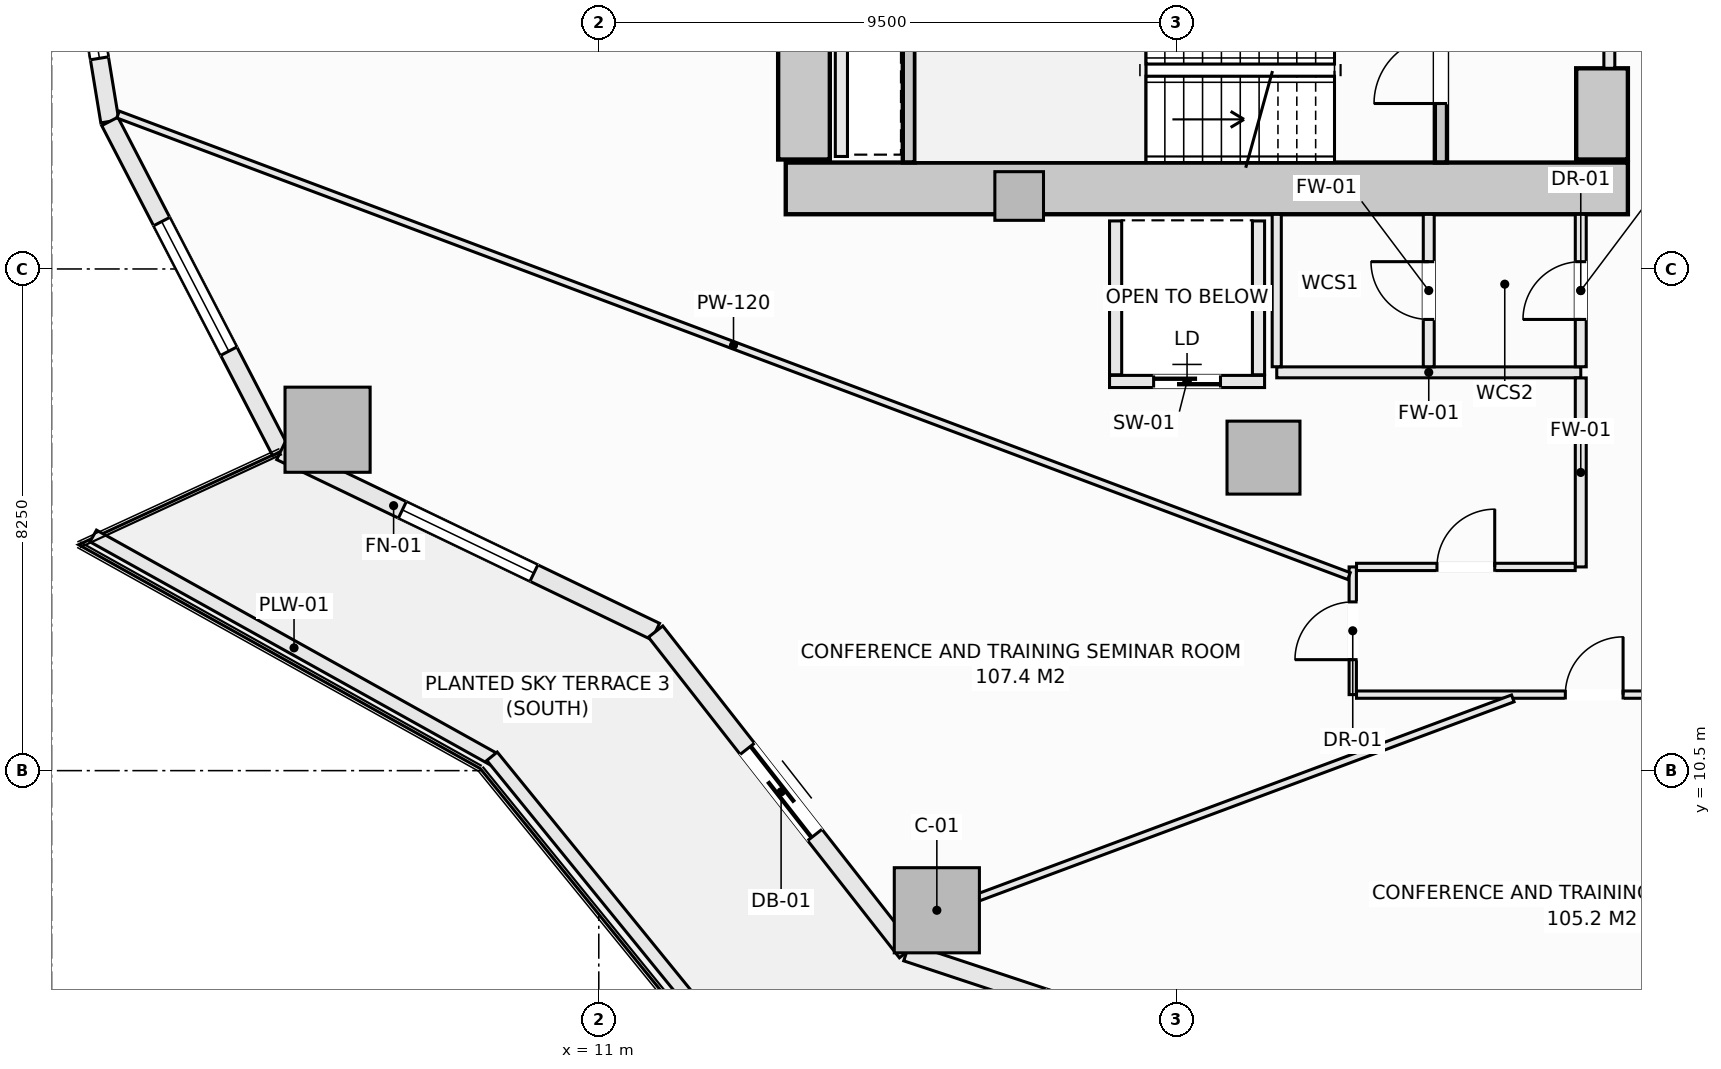
"""IFC4 building model, lengths in metres.
Left out: names, types, materials, properties, quantities, classifications, styles, units other than length and angle.
Written with IfcOpenShell. Run it as: python <this file> out.ifc"""

import sys

from ifc_helpers import new_model, si_unit, direction, frame, frame_2d, origin, origin_2d, place, context, subcontext, project, spatial, rectangle, extrude, element, fill, save


model = new_model("IFC4")
c1 = context("Model", 3, precision=1e-05, world=origin(), true_north=direction((0.0, 1.0)))
c2 = subcontext(c1, "Body", "Model", "MODEL_VIEW")
j1 = project(units=[si_unit("LENGTHUNIT", "METRE"), si_unit("PLANEANGLEUNIT", "RADIAN")], contexts=[c1])
p1 = place(None, origin())
s1 = spatial("IfcSite", under=j1, at=p1, CompositionType="ELEMENT")
p2 = place(p1, origin())
s2 = spatial("IfcBuilding", under=s1, at=p2, CompositionType="ELEMENT")
p3 = place(p2, frame((0.0, 0.0, 34.2)))
s3 = spatial("IfcBuildingStorey", under=s2, at=p3, CompositionType="ELEMENT", Elevation=34.2)
p4 = place(p3, frame((14.075, 20.075, -0.28), z_axis=(0.0, 0.0, 1.0), x_axis=(1.0, 0.0, 0.0)))
e1 = element("IfcWall", 1, at=p4, inside=s3, PredefinedType="SHEAR", context=c2, shape_type="SweptSolid", body=[
    extrude(rectangle(XDim=13.85, YDim=0.85, at=frame_2d((6.925, 0.0))), origin(), (0.0, 0.0, 1.0), 3.85),
])
p5 = place(p3, frame((14.375, 20.55, -0.28), z_axis=(0.0, 0.0, 1.0), x_axis=(0.0, 1.0, 0.0)))
e2 = element("IfcWall", 2, at=p5, inside=s3, PredefinedType="SHEAR", context=c2, shape_type="SweptSolid", body=[
    extrude(rectangle(XDim=12.9, YDim=0.85, at=frame_2d((6.45, 0.0))), origin(), (0.0, 0.0, 1.0), 3.85),
])
p6 = place(p3, frame((27.5, 20.55, -0.28), z_axis=(0.0, 0.0, 1.0), x_axis=(0.0, 1.0, 0.0)))
e3 = element("IfcWall", 3, at=p6, inside=s3, PredefinedType="SHEAR", context=c2, shape_type="SweptSolid", body=[
    extrude(rectangle(XDim=1.5, YDim=0.85, at=frame_2d((0.75, 0.0))), origin(), (0.0, 0.0, 1.0), 3.85),
])
for number, where, z_axis, x_axis in (
    (4, (6.54, 16.106, -0.28), (0.0, 0.0, 1.0), (1.0, 0.0, 0.0)),
    (5, (16.56, 8.204, -0.28), (0.0, 0.0, 1.0), (1.0, 0.0, 0.0)),
):
    element("IfcColumn", number, at=place(p3, frame(where, z_axis=z_axis, x_axis=x_axis)), inside=s3, PredefinedType="COLUMN", context=c2, shape_type="SweptSolid", body=[
        extrude(rectangle(XDim=1.4, YDim=1.4, at=origin_2d()), origin(), (0.0, 0.0, 1.0), 3.85),
    ])
p7 = place(p3, frame((21.932, 15.648, -0.28), z_axis=(0.0, 0.0, 1.0), x_axis=(1.0, 0.0, 0.0)))
e6 = element("IfcColumn", 6, at=p7, inside=s3, PredefinedType="COLUMN", context=c2, shape_type="SweptSolid", body=[
    extrude(rectangle(XDim=1.2, YDim=1.2, at=origin_2d()), origin(), (0.0, 0.0, 1.0), 3.85),
])
p8 = place(p3, frame((17.914, 19.95, -0.28), z_axis=(0.0, 0.0, 1.0), x_axis=(1.0, 0.0, 0.0)))
e7 = element("IfcColumn", 7, at=p8, inside=s3, PredefinedType="PILASTER", context=c2, shape_type="SweptSolid", body=[
    extrude(rectangle(XDim=0.8, YDim=0.8, at=origin_2d()), origin(), (0.0, 0.0, 1.0), 3.85),
])
p9 = place(p3, frame((2.0, 27.0, 0.0), z_axis=(0.0, 0.0, 1.0), x_axis=(0.162366057843, -0.98673059305, 0.0)))
e8 = element("IfcWall", 8, at=p9, inside=s3, PredefinedType="SOLIDWALL", context=c2, shape_type="SweptSolid", body=[
    extrude(rectangle(XDim=5.902, YDim=0.3, at=frame_2d((2.951, 0.0))), origin(), (0.0, 0.0, 1.0), 3.093),
])
p10 = place(p9, frame((2.45, 0.0, 0.85)))
e9 = element("IfcOpeningElement", 9, at=p10, cuts=e8, PredefinedType="OPENING", context=c2, shape_type="SweptSolid", body=[
    extrude(rectangle(XDim=2.4, YDim=1.9, at=frame_2d((1.2, 0.95))), frame((0.0, 0.16, 0.0), z_axis=(0.0, -1.0, 0.0), x_axis=(1.0, 0.0, 0.0)), (0.0, 0.0, 1.0), 0.32),
])
p11 = place(p3, frame((2.958, 21.177, 0.0), z_axis=(0.0, 0.0, 1.0), x_axis=(0.459809804413, -0.88801742312, 0.0)))
e10 = element("IfcWall", 10, at=p11, inside=s3, PredefinedType="SOLIDWALL", context=c2, shape_type="SweptSolid", body=[
    extrude(rectangle(XDim=6.111, YDim=0.3, at=frame_2d((3.055, 0.0))), origin(), (0.0, 0.0, 1.0), 3.093),
])
p12 = place(p11, frame((1.855, 0.0, 0.85)))
e11 = element("IfcOpeningElement", 11, at=p12, cuts=e10, PredefinedType="OPENING", context=c2, shape_type="SweptSolid", body=[
    extrude(rectangle(XDim=2.4, YDim=1.9, at=frame_2d((1.2, 0.95))), frame((0.0, 0.16, 0.0), z_axis=(0.0, -1.0, 0.0), x_axis=(1.0, 0.0, 0.0)), (0.0, 0.0, 1.0), 0.32),
])
p13 = place(p3, frame((5.768, 15.75, 0.0), z_axis=(0.0, 0.0, 1.0), x_axis=(0.901360393999, -0.433069786673, 0.0)))
e12 = element("IfcWall", 12, at=p13, inside=s3, PredefinedType="SOLIDWALL", context=c2, shape_type="SweptSolid", body=[
    extrude(rectangle(XDim=6.842, YDim=0.3, at=frame_2d((3.421, 0.0))), origin(), (0.0, 0.0, 1.0), 3.093),
])
p14 = place(p13, frame((2.221, 0.0, 0.85)))
e13 = element("IfcOpeningElement", 13, at=p14, cuts=e12, PredefinedType="OPENING", context=c2, shape_type="SweptSolid", body=[
    extrude(rectangle(XDim=2.4, YDim=1.9, at=frame_2d((1.2, 0.95))), frame((0.0, 0.16, 0.0), z_axis=(0.0, -1.0, 0.0), x_axis=(1.0, 0.0, 0.0)), (0.0, 0.0, 1.0), 0.32),
])
p15 = place(p3, frame((11.935, 12.787, 0.0), z_axis=(0.0, 0.0, 1.0), x_axis=(0.616421309777, -0.787416515482, 0.0)))
e14 = element("IfcWall", 14, at=p15, inside=s3, PredefinedType="SOLIDWALL", context=c2, shape_type="SweptSolid", body=[
    extrude(rectangle(XDim=6.696, YDim=0.3, at=frame_2d((3.348, 0.0))), origin(), (0.0, 0.0, 1.0), 3.093),
])
p16 = place(p15, frame((2.448, 0.0, 0.0)))
e15 = element("IfcOpeningElement", 15, at=p16, cuts=e14, PredefinedType="OPENING", context=c2, shape_type="SweptSolid", body=[
    extrude(rectangle(XDim=1.8, YDim=2.25, at=frame_2d((0.9, 1.125))), frame((0.0, 0.16, 0.0), z_axis=(0.0, -1.0, 0.0), x_axis=(1.0, 0.0, 0.0)), (0.0, 0.0, 1.0), 0.32),
])
p17 = place(p3, frame((16.062, 7.514, 0.0), z_axis=(0.0, 0.0, 1.0), x_axis=(0.949238715533, -0.31455661006, 0.0)))
e16 = element("IfcWall", 16, at=p17, inside=s3, PredefinedType="SOLIDWALL", context=c2, shape_type="SweptSolid", body=[
    extrude(rectangle(XDim=7.146, YDim=0.3, at=frame_2d((3.573, 0.0))), origin(), (0.0, 0.0, 1.0), 3.093),
])
p18 = place(p17, frame((2.373, 0.0, 0.85)))
e17 = element("IfcOpeningElement", 17, at=p18, cuts=e16, PredefinedType="OPENING", context=c2, shape_type="SweptSolid", body=[
    extrude(rectangle(XDim=2.4, YDim=1.9, at=frame_2d((1.2, 0.95))), frame((0.0, 0.16, 0.0), z_axis=(0.0, -1.0, 0.0), x_axis=(1.0, 0.0, 0.0)), (0.0, 0.0, 1.0), 0.32),
])
p19 = place(p3, frame((2.685, 14.359, 0.0), z_axis=(0.0, 0.0, 1.0), x_axis=(0.873500119739, -0.48682393205, 0.0)))
e18 = element("IfcWall", 18, at=p19, inside=s3, PredefinedType="PARAPET", context=c2, shape_type="SweptSolid", body=[
    extrude(rectangle(XDim=7.562, YDim=0.22, at=frame_2d((3.781, 0.0))), origin(), (0.0, 0.0, 1.0), 0.52),
])
p20 = place(p3, frame((9.244, 10.736, 0.0), z_axis=(0.0, 0.0, 1.0), x_axis=(0.630997450658, -0.775784903993, 0.0)))
e19 = element("IfcWall", 19, at=p20, inside=s3, PredefinedType="PARAPET", context=c2, shape_type="SweptSolid", body=[
    extrude(rectangle(XDim=7.718, YDim=0.22, at=frame_2d((3.859, 0.0))), origin(), (0.0, 0.0, 1.0), 0.52),
])
p21 = place(p3, frame((24.85, 20.502, -0.28), z_axis=(0.0, 0.0, 1.0), x_axis=(0.0, 1.0, 0.0)))
e20 = element("IfcWall", 20, at=p21, inside=s3, PredefinedType="SHEAR", context=c2, shape_type="SweptSolid", body=[
    extrude(rectangle(XDim=3.038, YDim=0.2, at=frame_2d((1.519, 0.0))), origin(), (0.0, 0.0, 1.0), 3.85),
])
p22 = place(p21, frame((0.969, 0.0, 0.28)))
e21 = element("IfcOpeningElement", 21, at=p22, cuts=e20, PredefinedType="OPENING", context=c2, shape_type="SweptSolid", body=[
    extrude(rectangle(XDim=1.1, YDim=2.15, at=frame_2d((0.55, 1.075))), frame((0.0, 0.11, 0.0), z_axis=(0.0, -1.0, 0.0), x_axis=(1.0, 0.0, 0.0)), (0.0, 0.0, 1.0), 0.22),
])
p23 = place(p3, frame((16.1, 20.502, -0.28), z_axis=(0.0, 0.0, 1.0), x_axis=(0.0, 1.0, 0.0)))
e22 = element("IfcWall", 22, at=p23, inside=s3, PredefinedType="SHEAR", context=c2, shape_type="SweptSolid", body=[
    extrude(rectangle(XDim=3.036, YDim=0.2, at=frame_2d((1.518, 0.0))), origin(), (0.0, 0.0, 1.0), 3.85),
])
p24 = place(p3, frame((19.4, 16.9, 0.0), z_axis=(0.0, 0.0, 1.0), x_axis=(1.0, 0.0, 0.0)))
e23 = element("IfcWall", 23, at=p24, inside=s3, PredefinedType="SOLIDWALL", context=c2, shape_type="SweptSolid", body=[
    extrude(rectangle(XDim=2.55, YDim=0.2, at=frame_2d((1.275, 0.0))), origin(), (0.0, 0.0, 1.0), 3.57),
])
p25 = place(p24, frame((0.725, 0.0, 0.0)))
e24 = element("IfcOpeningElement", 24, at=p25, cuts=e23, PredefinedType="OPENING", context=c2, shape_type="SweptSolid", body=[
    extrude(rectangle(XDim=1.1, YDim=2.2, at=frame_2d((0.55, 1.1))), frame((0.0, 0.11, 0.0), z_axis=(0.0, -1.0, 0.0), x_axis=(1.0, 0.0, 0.0)), (0.0, 0.0, 1.0), 0.22),
])
for number, where, z_axis, x_axis in (
    (25, (19.5, 17.01, 0.0), (0.0, 0.0, 1.0), (0.0, 1.0, 0.0)),
    (26, (21.85, 17.01, 0.0), (0.0, 0.0, 1.0), (0.0, 1.0, 0.0)),
):
    element("IfcWall", number, at=place(p3, frame(where, z_axis=z_axis, x_axis=x_axis)), inside=s3, PredefinedType="SOLIDWALL", context=c2, shape_type="SweptSolid", body=[
        extrude(rectangle(XDim=2.53, YDim=0.2, at=frame_2d((1.265, 0.0))), origin(), (0.0, 0.0, 1.0), 3.57),
    ])
p26 = place(p3, frame((14.99, 20.6, 0.0), z_axis=(0.0, 0.0, 1.0), x_axis=(0.0, 1.0, 0.0)))
e27 = element("IfcWall", 27, at=p26, inside=s3, PredefinedType="SOLIDWALL", context=c2, shape_type="SweptSolid", body=[
    extrude(rectangle(XDim=2.85, YDim=0.2, at=frame_2d((1.425, 0.0))), origin(), (0.0, 0.0, 1.0), 3.57),
])
p27 = place(p3, frame((27.62, 22.05, 0.0), z_axis=(0.0, 0.0, 1.0), x_axis=(0.0, 1.0, 0.0)))
e28 = element("IfcWall", 28, at=p27, inside=s3, PredefinedType="SOLIDWALL", context=c2, shape_type="SweptSolid", body=[
    extrude(rectangle(XDim=9.9, YDim=0.18, at=frame_2d((4.95, 0.0))), origin(), (0.0, 0.0, 1.0), 2.662),
])
p28 = place(p27, frame((4.475, 0.0, 0.0)))
e29 = element("IfcOpeningElement", 29, at=p28, cuts=e28, PredefinedType="OPENING", context=c2, shape_type="SweptSolid", body=[
    extrude(rectangle(XDim=0.95, YDim=2.1, at=frame_2d((0.475, 1.05))), frame((0.0, 0.1, 0.0), z_axis=(0.0, -1.0, 0.0), x_axis=(1.0, 0.0, 0.0)), (0.0, 0.0, 1.0), 0.2),
])
p29 = place(p27, frame((6.89, 0.0, 0.0)))
e30 = element("IfcOpeningElement", 30, at=p29, cuts=e28, PredefinedType="OPENING", context=c2, shape_type="SweptSolid", body=[
    extrude(rectangle(XDim=1.5, YDim=2.2, at=frame_2d((0.75, 1.1))), frame((0.0, 0.1, 0.0), z_axis=(0.0, -1.0, 0.0), x_axis=(1.0, 0.0, 0.0)), (0.0, 0.0, 1.0), 0.2),
])
p30 = place(p27, frame((1.51, 0.0, 0.0)))
e31 = element("IfcOpeningElement", 31, at=p30, cuts=e28, PredefinedType="OPENING", context=c2, shape_type="SweptSolid", body=[
    extrude(rectangle(XDim=1.5, YDim=2.2, at=frame_2d((0.75, 1.1))), frame((0.0, 0.1, 0.0), z_axis=(0.0, -1.0, 0.0), x_axis=(1.0, 0.0, 0.0)), (0.0, 0.0, 1.0), 0.2),
])
p31 = place(p3, frame((22.15, 17.05, 0.0), z_axis=(0.0, 0.0, 1.0), x_axis=(1.0, 0.0, 0.0)))
e32 = element("IfcWall", 32, at=p31, inside=s3, PredefinedType="SOLIDWALL", context=c2, shape_type="SweptSolid", body=[
    extrude(rectangle(XDim=5.0, YDim=0.18, at=frame_2d((2.5, 0.0))), origin(), (0.0, 0.0, 1.0), 3.57),
])
p32 = place(p3, frame((22.15, 17.142, 0.0), z_axis=(0.0, 0.0, 1.0), x_axis=(0.0, 1.0, 0.0)))
e33 = element("IfcWall", 33, at=p32, inside=s3, PredefinedType="PARTITIONING", context=c2, shape_type="SweptSolid", body=[
    extrude(rectangle(XDim=2.506, YDim=0.15, at=frame_2d((1.253, 0.0))), origin(), (0.0, 0.0, 1.0), 3.57),
])
p33 = place(p3, frame((24.65, 17.142, 0.0), z_axis=(0.0, 0.0, 1.0), x_axis=(0.0, 1.0, 0.0)))
e34 = element("IfcWall", 34, at=p33, inside=s3, PredefinedType="SOLIDWALL", context=c2, shape_type="SweptSolid", body=[
    extrude(rectangle(XDim=2.506, YDim=0.18, at=frame_2d((1.253, 0.0))), origin(), (0.0, 0.0, 1.0), 3.57),
])
p34 = place(p33, frame((0.778, 0.0, 0.0)))
e35 = element("IfcOpeningElement", 35, at=p34, cuts=e34, PredefinedType="OPENING", context=c2, shape_type="SweptSolid", body=[
    extrude(rectangle(XDim=0.95, YDim=2.1, at=frame_2d((0.475, 1.05))), frame((0.0, 0.1, 0.0), z_axis=(0.0, -1.0, 0.0), x_axis=(1.0, 0.0, 0.0)), (0.0, 0.0, 1.0), 0.2),
])
p35 = place(p3, frame((27.15, 13.85, 0.0), z_axis=(0.0, 0.0, 1.0), x_axis=(0.0, 1.0, 0.0)))
e36 = element("IfcWall", 36, at=p35, inside=s3, PredefinedType="SOLIDWALL", context=c2, shape_type="SweptSolid", body=[
    extrude(rectangle(XDim=3.108, YDim=0.18, at=frame_2d((1.554, 0.0))), origin(), (0.0, 0.0, 1.0), 3.57),
])
p36 = place(p3, frame((27.15, 17.142, 0.0), z_axis=(0.0, 0.0, 1.0), x_axis=(0.0, 1.0, 0.0)))
e37 = element("IfcWall", 37, at=p36, inside=s3, PredefinedType="SOLIDWALL", context=c2, shape_type="SweptSolid", body=[
    extrude(rectangle(XDim=2.506, YDim=0.18, at=frame_2d((1.253, 0.0))), origin(), (0.0, 0.0, 1.0), 3.57),
])
p37 = place(p36, frame((0.778, 0.0, 0.0)))
e38 = element("IfcOpeningElement", 38, at=p37, cuts=e37, PredefinedType="OPENING", context=c2, shape_type="SweptSolid", body=[
    extrude(rectangle(XDim=0.95, YDim=2.1, at=frame_2d((0.475, 1.05))), frame((0.0, 0.1, 0.0), z_axis=(0.0, -1.0, 0.0), x_axis=(1.0, 0.0, 0.0)), (0.0, 0.0, 1.0), 0.2),
])
p38 = place(p3, frame((23.4, 11.75, 0.0), z_axis=(0.0, 0.0, 1.0), x_axis=(0.0, 1.0, 0.0)))
e39 = element("IfcWall", 39, at=p38, inside=s3, PredefinedType="PARTITIONING", context=c2, shape_type="SweptSolid", body=[
    extrude(rectangle(XDim=2.1, YDim=0.12, at=frame_2d((1.05, 0.0))), origin(), (0.0, 0.0, 1.0), 3.57),
])
p39 = place(p38, frame((0.575, 0.0, 0.0)))
e40 = element("IfcOpeningElement", 40, at=p39, cuts=e39, PredefinedType="OPENING", context=c2, shape_type="SweptSolid", body=[
    extrude(rectangle(XDim=0.95, YDim=2.1, at=frame_2d((0.475, 1.05))), frame((0.0, 0.07, 0.0), z_axis=(0.0, -1.0, 0.0), x_axis=(1.0, 0.0, 0.0)), (0.0, 0.0, 1.0), 0.14),
])
p40 = place(p3, frame((23.462, 11.75, 0.0), z_axis=(0.0, 0.0, 1.0), x_axis=(1.0, 0.0, 0.0)))
e41 = element("IfcWall", 41, at=p40, inside=s3, PredefinedType="PARTITIONING", context=c2, shape_type="SweptSolid", body=[
    extrude(rectangle(XDim=19.495, YDim=0.12, at=frame_2d((9.748, 0.0))), origin(), (0.0, 0.0, 1.0), 3.57),
])
p41 = place(p40, frame((3.434, 0.0, 0.0)))
e42 = element("IfcOpeningElement", 42, at=p41, cuts=e41, PredefinedType="OPENING", context=c2, shape_type="SweptSolid", body=[
    extrude(rectangle(XDim=0.95, YDim=2.1, at=frame_2d((0.475, 1.05))), frame((0.0, 0.07, 0.0), z_axis=(0.0, -1.0, 0.0), x_axis=(1.0, 0.0, 0.0)), (0.0, 0.0, 1.0), 0.14),
])
p42 = place(p40, frame((11.388, 0.0, 0.0)))
e43 = element("IfcOpeningElement", 43, at=p42, cuts=e41, PredefinedType="OPENING", context=c2, shape_type="SweptSolid", body=[
    extrude(rectangle(XDim=0.95, YDim=2.1, at=frame_2d((0.475, 1.05))), frame((0.0, 0.07, 0.0), z_axis=(0.0, -1.0, 0.0), x_axis=(1.0, 0.0, 0.0)), (0.0, 0.0, 1.0), 0.14),
])
p43 = place(p3, frame((23.462, 13.85, 0.0), z_axis=(0.0, 0.0, 1.0), x_axis=(1.0, 0.0, 0.0)))
e44 = element("IfcWall", 44, at=p43, inside=s3, PredefinedType="PARTITIONING", context=c2, shape_type="SweptSolid", body=[
    extrude(rectangle(XDim=3.596, YDim=0.12, at=frame_2d((1.798, 0.0))), origin(), (0.0, 0.0, 1.0), 3.57),
])
p44 = place(p43, frame((1.323, 0.0, 0.0)))
e45 = element("IfcOpeningElement", 45, at=p44, cuts=e44, PredefinedType="OPENING", context=c2, shape_type="SweptSolid", body=[
    extrude(rectangle(XDim=0.95, YDim=2.1, at=frame_2d((0.475, 1.05))), frame((0.0, 0.07, 0.0), z_axis=(0.0, -1.0, 0.0), x_axis=(1.0, 0.0, 0.0)), (0.0, 0.0, 1.0), 0.14),
])
p45 = place(p3, frame((3.094, 21.29, 0.0), z_axis=(0.0, 0.0, 1.0), x_axis=(0.936344026666, -0.35108384145, 0.0)))
e46 = element("IfcWall", 46, at=p45, inside=s3, PredefinedType="PARTITIONING", context=c2, shape_type="SweptSolid", body=[
    extrude(rectangle(XDim=21.62, YDim=0.12, at=frame_2d((10.81, 0.0))), origin(), (0.0, 0.0, 1.0), 3.57),
])
p46 = place(p3, frame((15.932, 7.927, 0.0), z_axis=(0.0, 0.0, 1.0), x_axis=(0.937141242974, 0.348950269689, 0.0)))
e47 = element("IfcWall", 47, at=p46, inside=s3, PredefinedType="PARTITIONING", context=c2, shape_type="SweptSolid", body=[
    extrude(rectangle(XDim=10.777, YDim=0.12, at=frame_2d((5.389, 0.0))), origin(), (0.0, 0.0, 1.0), 2.934),
])
p47 = place(p10, origin())
e48 = element("IfcWindow", 48, at=p47, inside=s3, PartitioningType="SINGLE_PANEL", PredefinedType="WINDOW", context=c2, shape_type="SweptSolid", body=[
    extrude(rectangle(XDim=2.4, YDim=1.9, at=frame_2d((1.2, 0.95))), frame((0.0, 0.03, 0.0), z_axis=(0.0, -1.0, 0.0), x_axis=(1.0, 0.0, 0.0)), (0.0, 0.0, 1.0), 0.06),
])
fill(e9, e48)
p48 = place(p12, origin())
e49 = element("IfcWindow", 49, at=p48, inside=s3, PartitioningType="SINGLE_PANEL", PredefinedType="WINDOW", context=c2, shape_type="SweptSolid", body=[
    extrude(rectangle(XDim=2.4, YDim=1.9, at=frame_2d((1.2, 0.95))), frame((0.0, 0.03, 0.0), z_axis=(0.0, -1.0, 0.0), x_axis=(1.0, 0.0, 0.0)), (0.0, 0.0, 1.0), 0.06),
])
fill(e11, e49)
p49 = place(p14, origin())
e50 = element("IfcWindow", 50, at=p49, inside=s3, PartitioningType="SINGLE_PANEL", PredefinedType="WINDOW", context=c2, shape_type="SweptSolid", body=[
    extrude(rectangle(XDim=2.4, YDim=1.9, at=frame_2d((1.2, 0.95))), frame((0.0, 0.03, 0.0), z_axis=(0.0, -1.0, 0.0), x_axis=(1.0, 0.0, 0.0)), (0.0, 0.0, 1.0), 0.06),
])
fill(e13, e50)
p50 = place(p16, frame((1.8, 0.0, 0.0), z_axis=(0.0, 0.0, 1.0), x_axis=(-1.0, 0.0, 0.0)))
e51 = element("IfcDoor", 51, at=p50, inside=s3, OperationType="SLIDING_TO_LEFT", PredefinedType="DOOR", context=c2, shape_type="SweptSolid", body=[
    extrude(rectangle(XDim=1.8, YDim=2.25, at=frame_2d((0.9, 1.125))), frame((0.0, 0.025, 0.0), z_axis=(0.0, -1.0, 0.0), x_axis=(1.0, 0.0, 0.0)), (0.0, 0.0, 1.0), 0.05),
])
fill(e15, e51)
p51 = place(p22, origin())
e52 = element("IfcDoor", 52, at=p51, inside=s3, OperationType="SINGLE_SWING_LEFT", PredefinedType="DOOR", context=c2, shape_type="SweptSolid", body=[
    extrude(rectangle(XDim=1.1, YDim=2.15, at=frame_2d((0.55, 1.075))), frame((0.0, 0.025, 0.0), z_axis=(0.0, -1.0, 0.0), x_axis=(1.0, 0.0, 0.0)), (0.0, 0.0, 1.0), 0.05),
])
fill(e21, e52)
p52 = place(p25, origin())
e53 = element("IfcDoor", 53, at=p52, inside=s3, OperationType="SLIDING_TO_LEFT", PredefinedType="DOOR", context=c2, shape_type="SweptSolid", body=[
    extrude(rectangle(XDim=1.1, YDim=2.2, at=frame_2d((0.55, 1.1))), frame((0.0, 0.025, 0.0), z_axis=(0.0, -1.0, 0.0), x_axis=(1.0, 0.0, 0.0)), (0.0, 0.0, 1.0), 0.05),
])
fill(e24, e53)
p53 = place(p37, origin())
e54 = element("IfcDoor", 54, at=p53, inside=s3, OperationType="SINGLE_SWING_LEFT", PredefinedType="DOOR", context=c2, shape_type="SweptSolid", body=[
    extrude(rectangle(XDim=0.95, YDim=2.1, at=frame_2d((0.475, 1.05))), frame((0.0, 0.025, 0.0), z_axis=(0.0, -1.0, 0.0), x_axis=(1.0, 0.0, 0.0)), (0.0, 0.0, 1.0), 0.05),
])
fill(e38, e54)
p54 = place(p44, origin())
e55 = element("IfcDoor", 55, at=p54, inside=s3, OperationType="SINGLE_SWING_RIGHT", PredefinedType="DOOR", context=c2, shape_type="SweptSolid", body=[
    extrude(rectangle(XDim=0.95, YDim=2.1, at=frame_2d((0.475, 1.05))), frame((0.0, 0.025, 0.0), z_axis=(0.0, -1.0, 0.0), x_axis=(1.0, 0.0, 0.0)), (0.0, 0.0, 1.0), 0.05),
])
fill(e45, e55)
p55 = place(p39, origin())
e56 = element("IfcDoor", 56, at=p55, inside=s3, OperationType="SINGLE_SWING_LEFT", PredefinedType="DOOR", context=c2, shape_type="SweptSolid", body=[
    extrude(rectangle(XDim=0.95, YDim=2.1, at=frame_2d((0.475, 1.05))), frame((0.0, 0.025, 0.0), z_axis=(0.0, -1.0, 0.0), x_axis=(1.0, 0.0, 0.0)), (0.0, 0.0, 1.0), 0.05),
])
fill(e40, e56)
p56 = place(p41, origin())
e57 = element("IfcDoor", 57, at=p56, inside=s3, OperationType="SINGLE_SWING_RIGHT", PredefinedType="DOOR", context=c2, shape_type="SweptSolid", body=[
    extrude(rectangle(XDim=0.95, YDim=2.1, at=frame_2d((0.475, 1.05))), frame((0.0, 0.025, 0.0), z_axis=(0.0, -1.0, 0.0), x_axis=(1.0, 0.0, 0.0)), (0.0, 0.0, 1.0), 0.05),
])
fill(e42, e57)
p57 = place(p34, origin())
e58 = element("IfcDoor", 58, at=p57, inside=s3, OperationType="SINGLE_SWING_RIGHT", PredefinedType="DOOR", context=c2, shape_type="SweptSolid", body=[
    extrude(rectangle(XDim=0.95, YDim=2.1, at=frame_2d((0.475, 1.05))), frame((0.0, 0.025, 0.0), z_axis=(0.0, -1.0, 0.0), x_axis=(1.0, 0.0, 0.0)), (0.0, 0.0, 1.0), 0.05),
])
fill(e35, e58)
save(model, sys.argv[1])
